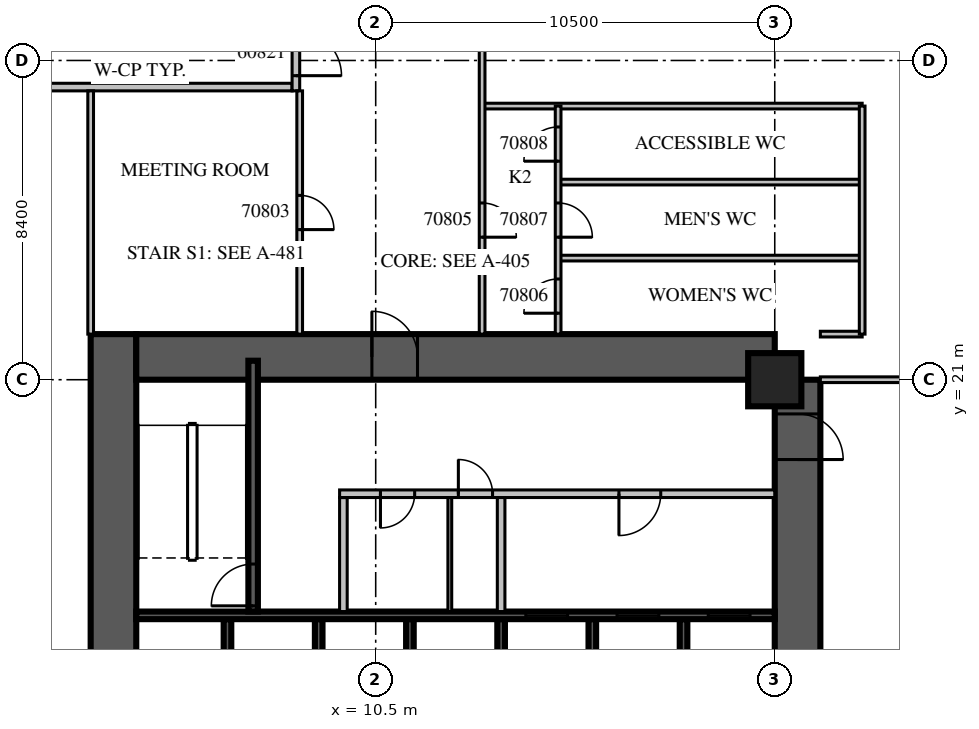
"""IFC4 building model, lengths in metres.
Left out: names, types, materials, properties, quantities, classifications, styles, units other than length and angle.
Written with IfcOpenShell. Run it as: python <this file> out.ifc"""

import sys

from ifc_helpers import new_model, si_unit, direction, frame, frame_2d, origin, origin_2d, place, context, subcontext, project, spatial, rectangle, extrude, source, transform, mapped, element, fill, save


model = new_model("IFC4")
c1 = context("Model", 3, precision=1e-05, world=origin(), true_north=direction((0.0, 1.0)))
c2 = subcontext(c1, "Body", "Model", "MODEL_VIEW")
j1 = project(units=[si_unit("LENGTHUNIT", "METRE"), si_unit("PLANEANGLEUNIT", "RADIAN")], contexts=[c1])
p1 = place(None, origin())
s1 = spatial("IfcSite", under=j1, at=p1, CompositionType="ELEMENT")
p2 = place(p1, origin())
s2 = spatial("IfcBuilding", under=s1, at=p2, CompositionType="ELEMENT")
p3 = place(p2, frame((0.0, 0.0, 29.1)))
s3 = spatial("IfcBuildingStorey", under=s2, at=p3, CompositionType="ELEMENT", Elevation=29.1)
m1 = source(origin(), c2, "Body", "SweptSolid", [
    extrude(rectangle(XDim=1.4, YDim=1.4, at=origin_2d()), origin(), (0.0, 0.0, 1.0), 5.4),
])
p4 = place(p3, frame((21.0, 21.0, 0.0), z_axis=(0.0, 0.0, 1.0), x_axis=(1.0, 0.0, 0.0)))
e1 = element("IfcColumn", 1, at=p4, inside=s3, PredefinedType="COLUMN", context=c2, shape_type="MappedRepresentation", body=[
    mapped(m1, transform((0.0, 0.0, 0.0), scale=1.0)),
])
m2 = source(origin(), c2, "Body", "SweptSolid", [
    extrude(rectangle(XDim=18.0, YDim=1.2, at=frame_2d((9.0, 0.0))), origin(), (0.0, 0.0, 1.0), 5.4),
])
p5 = place(p3, frame((3.6, 4.2, 0.0), z_axis=(0.0, 0.0, 1.0), x_axis=(0.0, 1.0, 0.0)))
e2 = element("IfcWall", 2, at=p5, inside=s3, PredefinedType="SHEAR", context=c2, shape_type="MappedRepresentation", body=[
    mapped(m2, transform((0.0, 0.0, 0.0), scale=1.0)),
])
m3 = source(origin(), c2, "Body", "SweptSolid", [
    extrude(rectangle(XDim=2.2, YDim=2.1, at=frame_2d((1.1, 1.05))), frame((0.0, 0.61, 0.0), z_axis=(0.0, -1.0, 0.0), x_axis=(1.0, 0.0, 0.0)), (0.0, 0.0, 1.0), 1.22),
])
p6 = place(p5, frame((4.6, 0.0, 0.0)))
e3 = element("IfcOpeningElement", 3, at=p6, cuts=e2, PredefinedType="OPENING", context=c2, shape_type="MappedRepresentation", body=[
    mapped(m3, transform((0.0, 0.0, 0.0), scale=1.0)),
])
m4 = source(origin(), c2, "Body", "SweptSolid", [
    extrude(rectangle(XDim=16.8, YDim=1.2, at=frame_2d((8.4, 0.0))), origin(), (0.0, 0.0, 1.0), 5.4),
])
p7 = place(p3, frame((21.6, 4.2, 0.0), z_axis=(0.0, 0.0, 1.0), x_axis=(0.0, 1.0, 0.0)))
e4 = element("IfcWall", 4, at=p7, inside=s3, PredefinedType="SHEAR", context=c2, shape_type="MappedRepresentation", body=[
    mapped(m4, transform((0.0, 0.0, 0.0), scale=1.0)),
])
p8 = place(p7, frame((4.2, 0.0, 0.0)))
e5 = element("IfcOpeningElement", 5, at=p8, cuts=e4, PredefinedType="OPENING", context=c2, shape_type="MappedRepresentation", body=[
    mapped(m3, transform((0.0, 0.0, 0.0), scale=1.0)),
])
m5 = source(origin(), c2, "Body", "SweptSolid", [
    extrude(rectangle(XDim=1.2, YDim=2.1, at=frame_2d((0.6, 1.05))), frame((0.0, 0.61, 0.0), z_axis=(0.0, -1.0, 0.0), x_axis=(1.0, 0.0, 0.0)), (0.0, 0.0, 1.0), 1.22),
])
p9 = place(p7, frame((14.7, 0.0, 0.0)))
e6 = element("IfcOpeningElement", 6, at=p9, cuts=e4, PredefinedType="OPENING", context=c2, shape_type="MappedRepresentation", body=[
    mapped(m5, transform((0.0, 0.0, 0.0), scale=1.0)),
])
p10 = place(p3, frame((4.2, 21.6, 0.0), z_axis=(0.0, 0.0, 1.0), x_axis=(1.0, 0.0, 0.0)))
e7 = element("IfcWall", 7, at=p10, inside=s3, PredefinedType="SHEAR", context=c2, shape_type="MappedRepresentation", body=[
    mapped(m4, transform((0.0, 0.0, 0.0), scale=1.0)),
])
p11 = place(p10, frame((6.2, 0.0, 0.0)))
e8 = element("IfcOpeningElement", 8, at=p11, cuts=e7, PredefinedType="OPENING", context=c2, shape_type="MappedRepresentation", body=[
    mapped(m5, transform((0.0, 0.0, 0.0), scale=1.0)),
])
m6 = source(origin(), c2, "Body", "SweptSolid", [
    extrude(rectangle(XDim=3.0, YDim=0.2, at=frame_2d((1.5, 0.0))), origin(), (0.0, 0.0, 1.0), 5.4),
])
for number, where, z_axis, x_axis in (
    (9, (6.6, 11.7, 0.0), (0.0, 0.0, 1.0), (0.0, 1.0, 0.0)),
    (10, (9.0, 11.7, 0.0), (0.0, 0.0, 1.0), (0.0, 1.0, 0.0)),
    (11, (11.4, 11.7, 0.0), (0.0, 0.0, 1.0), (0.0, 1.0, 0.0)),
    (12, (13.8, 11.7, 0.0), (0.0, 0.0, 1.0), (0.0, 1.0, 0.0)),
    (13, (16.2, 11.7, 0.0), (0.0, 0.0, 1.0), (0.0, 1.0, 0.0)),
    (14, (18.6, 11.7, 0.0), (0.0, 0.0, 1.0), (0.0, 1.0, 0.0)),
):
    element("IfcWall", number, at=place(p3, frame(where, z_axis=z_axis, x_axis=x_axis)), inside=s3, PredefinedType="SOLIDWALL", context=c2, shape_type="MappedRepresentation", body=[
        mapped(m6, transform((0.0, 0.0, 0.0), scale=1.0)),
    ])
m7 = source(origin(), c2, "Body", "SweptSolid", [
    extrude(rectangle(XDim=16.8, YDim=0.2, at=frame_2d((8.4, 0.0))), origin(), (0.0, 0.0, 1.0), 5.4),
])
p12 = place(p3, frame((4.2, 14.8, 0.0), z_axis=(0.0, 0.0, 1.0), x_axis=(1.0, 0.0, 0.0)))
e15 = element("IfcWall", 15, at=p12, inside=s3, PredefinedType="SOLIDWALL", context=c2, shape_type="MappedRepresentation", body=[
    mapped(m7, transform((0.0, 0.0, 0.0), scale=1.0)),
])
m8 = source(origin(), c2, "Body", "SweptSolid", [
    extrude(rectangle(XDim=1.1, YDim=2.1, at=frame_2d((0.55, 1.05))), frame((0.0, 0.11, 0.0), z_axis=(0.0, -1.0, 0.0), x_axis=(1.0, 0.0, 0.0)), (0.0, 0.0, 1.0), 0.22),
])
p13 = place(p12, frame((10.25, 0.0, 0.0)))
e16 = element("IfcOpeningElement", 16, at=p13, cuts=e15, PredefinedType="OPENING", context=c2, shape_type="MappedRepresentation", body=[
    mapped(m8, transform((0.0, 0.0, 0.0), scale=1.0)),
])
p14 = place(p12, frame((12.65, 0.0, 0.0)))
e17 = element("IfcOpeningElement", 17, at=p14, cuts=e15, PredefinedType="OPENING", context=c2, shape_type="MappedRepresentation", body=[
    mapped(m8, transform((0.0, 0.0, 0.0), scale=1.0)),
])
p15 = place(p12, frame((15.05, 0.0, 0.0)))
e18 = element("IfcOpeningElement", 18, at=p15, cuts=e15, PredefinedType="OPENING", context=c2, shape_type="MappedRepresentation", body=[
    mapped(m8, transform((0.0, 0.0, 0.0), scale=1.0)),
])
m9 = source(origin(), c2, "Body", "SweptSolid", [
    extrude(rectangle(XDim=6.6, YDim=0.25, at=frame_2d((3.3, 0.0))), origin(), (0.0, 0.0, 1.0), 4.8),
])
p16 = place(p3, frame((7.275, 14.9, 0.0), z_axis=(0.0, 0.0, 1.0), x_axis=(0.0, 1.0, 0.0)))
e19 = element("IfcWall", 19, at=p16, inside=s3, PredefinedType="SOLIDWALL", context=c2, shape_type="MappedRepresentation", body=[
    mapped(m9, transform((0.0, 0.0, 0.0), scale=1.0)),
])
m10 = source(origin(), c2, "Body", "SweptSolid", [
    extrude(rectangle(XDim=1.1, YDim=2.1, at=frame_2d((0.55, 1.05))), frame((0.0, 0.135, 0.0), z_axis=(0.0, -1.0, 0.0), x_axis=(1.0, 0.0, 0.0)), (0.0, 0.0, 1.0), 0.27),
])
p17 = place(p16, frame((0.15, 0.0, 0.0)))
e20 = element("IfcOpeningElement", 20, at=p17, cuts=e19, PredefinedType="OPENING", context=c2, shape_type="MappedRepresentation", body=[
    mapped(m10, transform((0.0, 0.0, 0.0), scale=1.0)),
])
m11 = source(origin(), c2, "Body", "SweptSolid", [
    extrude(rectangle(XDim=3.0, YDim=0.2, at=frame_2d((1.5, 0.0))), origin(), (0.0, 0.0, 1.0), 4.8),
])
p18 = place(p3, frame((9.65, 14.9, 0.0), z_axis=(0.0, 0.0, 1.0), x_axis=(0.0, 1.0, 0.0)))
e21 = element("IfcWall", 21, at=p18, inside=s3, PredefinedType="PARTITIONING", context=c2, shape_type="MappedRepresentation", body=[
    mapped(m11, transform((0.0, 0.0, 0.0), scale=1.0)),
])
m12 = source(origin(), c2, "Body", "SweptSolid", [
    extrude(rectangle(XDim=11.45, YDim=0.2, at=frame_2d((5.725, 0.0))), origin(), (0.0, 0.0, 1.0), 4.8),
])
p19 = place(p3, frame((9.55, 18.0, 0.0), z_axis=(0.0, 0.0, 1.0), x_axis=(1.0, 0.0, 0.0)))
e22 = element("IfcWall", 22, at=p19, inside=s3, PredefinedType="PARTITIONING", context=c2, shape_type="MappedRepresentation", body=[
    mapped(m12, transform((0.0, 0.0, 0.0), scale=1.0)),
])
m13 = source(origin(), c2, "Body", "SweptSolid", [
    extrude(rectangle(XDim=0.9, YDim=2.1, at=frame_2d((0.45, 1.05))), frame((0.0, 0.11, 0.0), z_axis=(0.0, -1.0, 0.0), x_axis=(1.0, 0.0, 0.0)), (0.0, 0.0, 1.0), 0.22),
])
p20 = place(p19, frame((1.075, 0.0, 0.0)))
e23 = element("IfcOpeningElement", 23, at=p20, cuts=e22, PredefinedType="OPENING", context=c2, shape_type="MappedRepresentation", body=[
    mapped(m13, transform((0.0, 0.0, 0.0), scale=1.0)),
])
p21 = place(p19, frame((3.125, 0.0, 0.0)))
e24 = element("IfcOpeningElement", 24, at=p21, cuts=e22, PredefinedType="OPENING", context=c2, shape_type="MappedRepresentation", body=[
    mapped(m13, transform((0.0, 0.0, 0.0), scale=1.0)),
])
p22 = place(p19, frame((7.35, 0.0, 0.0)))
e25 = element("IfcOpeningElement", 25, at=p22, cuts=e22, PredefinedType="OPENING", context=c2, shape_type="MappedRepresentation", body=[
    mapped(m8, transform((0.0, 0.0, 0.0), scale=1.0)),
])
p23 = place(p3, frame((13.8, 14.9, 0.0), z_axis=(0.0, 0.0, 1.0), x_axis=(0.0, 1.0, 0.0)))
e26 = element("IfcWall", 26, at=p23, inside=s3, PredefinedType="PARTITIONING", context=c2, shape_type="MappedRepresentation", body=[
    mapped(m11, transform((0.0, 0.0, 0.0), scale=1.0)),
])
m14 = source(origin(), c2, "Body", "SweptSolid", [
    extrude(rectangle(XDim=3.0, YDim=0.1, at=frame_2d((1.5, 0.0))), origin(), (0.0, 0.0, 1.0), 4.8),
])
p24 = place(p3, frame((12.45, 14.9, 0.0), z_axis=(0.0, 0.0, 1.0), x_axis=(0.0, 1.0, 0.0)))
e27 = element("IfcWall", 27, at=p24, inside=s3, PredefinedType="PARTITIONING", context=c2, shape_type="MappedRepresentation", body=[
    mapped(m14, transform((0.0, 0.0, 0.0), scale=1.0)),
])
m15 = source(origin(), c2, "Body", "SweptSolid", [
    extrude(rectangle(XDim=8.0, YDim=0.2, at=frame_2d((4.0, 0.0))), origin(), (0.0, 0.0, 1.0), 4.8),
])
p25 = place(p3, frame((0.3, 28.7, 0.0), z_axis=(0.0, 0.0, 1.0), x_axis=(1.0, 0.0, 0.0)))
e28 = element("IfcWall", 28, at=p25, inside=s3, PredefinedType="PARTITIONING", context=c2, shape_type="MappedRepresentation", body=[
    mapped(m15, transform((0.0, 0.0, 0.0), scale=1.0)),
])
m16 = source(origin(), c2, "Body", "SweptSolid", [
    extrude(rectangle(XDim=5.45, YDim=0.2, at=frame_2d((2.725, 0.0))), origin(), (0.0, 0.0, 1.0), 4.8),
])
p26 = place(p3, frame((8.4, 28.6, 0.0), z_axis=(0.0, 0.0, 1.0), x_axis=(0.0, 1.0, 0.0)))
e29 = element("IfcWall", 29, at=p26, inside=s3, PredefinedType="PARTITIONING", context=c2, shape_type="MappedRepresentation", body=[
    mapped(m16, transform((0.0, 0.0, 0.0), scale=1.0)),
])
m17 = source(origin(), c2, "Body", "SweptSolid", [
    extrude(rectangle(XDim=1.2, YDim=2.1, at=frame_2d((0.6, 1.05))), frame((0.0, 0.11, 0.0), z_axis=(0.0, -1.0, 0.0), x_axis=(1.0, 0.0, 0.0)), (0.0, 0.0, 1.0), 0.22),
])
p27 = place(p26, frame((0.4, 0.0, 0.0)))
e30 = element("IfcOpeningElement", 30, at=p27, cuts=e29, PredefinedType="OPENING", context=c2, shape_type="MappedRepresentation", body=[
    mapped(m17, transform((0.0, 0.0, 0.0), scale=1.0)),
])
p28 = place(p26, frame((3.25, 0.0, 0.0)))
e31 = element("IfcOpeningElement", 31, at=p28, cuts=e29, PredefinedType="OPENING", context=c2, shape_type="MappedRepresentation", body=[
    mapped(m13, transform((0.0, 0.0, 0.0), scale=1.0)),
])
m18 = source(origin(), c2, "Body", "SweptSolid", [
    extrude(rectangle(XDim=16.2, YDim=0.15, at=frame_2d((8.1, 0.0))), origin(), (0.0, 0.0, 1.0), 4.8),
])
p29 = place(p3, frame((22.2, 21.0, 0.0), z_axis=(0.0, 0.0, 1.0), x_axis=(1.0, 0.0, 0.0)))
e32 = element("IfcWall", 32, at=p29, inside=s3, PredefinedType="PARTITIONING", context=c2, shape_type="MappedRepresentation", body=[
    mapped(m18, transform((0.0, 0.0, 0.0), scale=1.0)),
])
m19 = source(origin(), c2, "Body", "SweptSolid", [
    extrude(rectangle(XDim=1.1, YDim=0.15, at=frame_2d((0.55, 0.0))), origin(), (0.0, 0.0, 1.0), 4.8),
])
p30 = place(p3, frame((22.2, 22.2, 0.0), z_axis=(0.0, 0.0, 1.0), x_axis=(1.0, 0.0, 0.0)))
e33 = element("IfcWall", 33, at=p30, inside=s3, PredefinedType="PARTITIONING", context=c2, shape_type="MappedRepresentation", body=[
    mapped(m19, transform((0.0, 0.0, 0.0), scale=1.0)),
])
m20 = source(origin(), c2, "Body", "SweptSolid", [
    extrude(rectangle(XDim=8.0, YDim=0.15, at=frame_2d((4.0, 0.0))), origin(), (0.0, 0.0, 1.0), 4.8),
])
for number, where, z_axis, x_axis in (
    (34, (15.3, 24.2, 0.0), (0.0, 0.0, 1.0), (1.0, 0.0, 0.0)),
    (35, (15.3, 26.2, 0.0), (0.0, 0.0, 1.0), (1.0, 0.0, 0.0)),
):
    element("IfcWall", number, at=place(p3, frame(where, z_axis=z_axis, x_axis=x_axis)), inside=s3, PredefinedType="PARTITIONING", context=c2, shape_type="MappedRepresentation", body=[
        mapped(m20, transform((0.0, 0.0, 0.0), scale=1.0)),
    ])
m21 = source(origin(), c2, "Body", "SweptSolid", [
    extrude(rectangle(XDim=10.0, YDim=0.15, at=frame_2d((5.0, 0.0))), origin(), (0.0, 0.0, 1.0), 4.8),
])
p31 = place(p3, frame((13.3, 28.2, 0.0), z_axis=(0.0, 0.0, 1.0), x_axis=(1.0, 0.0, 0.0)))
e36 = element("IfcWall", 36, at=p31, inside=s3, PredefinedType="PARTITIONING", context=c2, shape_type="MappedRepresentation", body=[
    mapped(m21, transform((0.0, 0.0, 0.0), scale=1.0)),
])
m22 = source(origin(), c2, "Body", "SweptSolid", [
    extrude(rectangle(XDim=6.4, YDim=0.15, at=frame_2d((3.2, 0.0))), origin(), (0.0, 0.0, 1.0), 4.8),
])
p32 = place(p3, frame((3.0, 22.2, 0.0), z_axis=(0.0, 0.0, 1.0), x_axis=(0.0, 1.0, 0.0)))
e37 = element("IfcWall", 37, at=p32, inside=s3, PredefinedType="PARTITIONING", context=c2, shape_type="MappedRepresentation", body=[
    mapped(m22, transform((0.0, 0.0, 0.0), scale=1.0)),
])
p33 = place(p3, frame((8.5, 22.2, 0.0), z_axis=(0.0, 0.0, 1.0), x_axis=(0.0, 1.0, 0.0)))
e38 = element("IfcWall", 38, at=p33, inside=s3, PredefinedType="PARTITIONING", context=c2, shape_type="MappedRepresentation", body=[
    mapped(m22, transform((0.0, 0.0, 0.0), scale=1.0)),
])
m23 = source(origin(), c2, "Body", "SweptSolid", [
    extrude(rectangle(XDim=0.9, YDim=2.1, at=frame_2d((0.45, 1.05))), frame((0.0, 0.085, 0.0), z_axis=(0.0, -1.0, 0.0), x_axis=(1.0, 0.0, 0.0)), (0.0, 0.0, 1.0), 0.17),
])
p34 = place(p33, frame((2.75, 0.0, 0.0)))
e39 = element("IfcOpeningElement", 39, at=p34, cuts=e38, PredefinedType="OPENING", context=c2, shape_type="MappedRepresentation", body=[
    mapped(m23, transform((0.0, 0.0, 0.0), scale=1.0)),
])
m24 = source(origin(), c2, "Body", "SweptSolid", [
    extrude(rectangle(XDim=20.3, YDim=0.15, at=frame_2d((10.15, 0.0))), origin(), (0.0, 0.0, 1.0), 4.8),
])
p35 = place(p3, frame((13.3, 22.2, 0.0), z_axis=(0.0, 0.0, 1.0), x_axis=(0.0, 1.0, 0.0)))
e40 = element("IfcWall", 40, at=p35, inside=s3, PredefinedType="PARTITIONING", context=c2, shape_type="MappedRepresentation", body=[
    mapped(m24, transform((0.0, 0.0, 0.0), scale=1.0)),
])
p36 = place(p35, frame((2.55, 0.0, 0.0)))
e41 = element("IfcOpeningElement", 41, at=p36, cuts=e40, PredefinedType="OPENING", context=c2, shape_type="MappedRepresentation", body=[
    mapped(m23, transform((0.0, 0.0, 0.0), scale=1.0)),
])
m25 = source(origin(), c2, "Body", "SweptSolid", [
    extrude(rectangle(XDim=6.0, YDim=0.15, at=frame_2d((3.0, 0.0))), origin(), (0.0, 0.0, 1.0), 4.8),
])
p37 = place(p3, frame((15.3, 22.2, 0.0), z_axis=(0.0, 0.0, 1.0), x_axis=(0.0, 1.0, 0.0)))
e42 = element("IfcWall", 42, at=p37, inside=s3, PredefinedType="PARTITIONING", context=c2, shape_type="MappedRepresentation", body=[
    mapped(m25, transform((0.0, 0.0, 0.0), scale=1.0)),
])
p38 = place(p37, frame((0.55, 0.0, 0.0)))
e43 = element("IfcOpeningElement", 43, at=p38, cuts=e42, PredefinedType="OPENING", context=c2, shape_type="MappedRepresentation", body=[
    mapped(m23, transform((0.0, 0.0, 0.0), scale=1.0)),
])
p39 = place(p37, frame((2.55, 0.0, 0.0)))
e44 = element("IfcOpeningElement", 44, at=p39, cuts=e42, PredefinedType="OPENING", context=c2, shape_type="MappedRepresentation", body=[
    mapped(m23, transform((0.0, 0.0, 0.0), scale=1.0)),
])
p40 = place(p37, frame((4.55, 0.0, 0.0)))
e45 = element("IfcOpeningElement", 45, at=p40, cuts=e42, PredefinedType="OPENING", context=c2, shape_type="MappedRepresentation", body=[
    mapped(m23, transform((0.0, 0.0, 0.0), scale=1.0)),
])
p41 = place(p3, frame((23.3, 22.2, 0.0), z_axis=(0.0, 0.0, 1.0), x_axis=(0.0, 1.0, 0.0)))
e46 = element("IfcWall", 46, at=p41, inside=s3, PredefinedType="PARTITIONING", context=c2, shape_type="MappedRepresentation", body=[
    mapped(m25, transform((0.0, 0.0, 0.0), scale=1.0)),
])
m26 = source(origin(), c2, "Body", "SweptSolid", [
    extrude(rectangle(XDim=1.1, YDim=2.1, at=frame_2d((0.55, 1.05))), frame((0.0, 0.025, 0.0), z_axis=(0.0, -1.0, 0.0), x_axis=(1.0, 0.0, 0.0)), (0.0, 0.0, 1.0), 0.05),
])
p42 = place(p13, origin())
e47 = element("IfcDoor", 47, at=p42, inside=s3, OperationType="SLIDING_TO_LEFT", PredefinedType="DOOR", context=c2, shape_type="MappedRepresentation", body=[
    mapped(m26, transform((0.0, 0.0, 0.0), scale=1.0)),
])
fill(e16, e47)
p43 = place(p14, origin())
e48 = element("IfcDoor", 48, at=p43, inside=s3, OperationType="SLIDING_TO_LEFT", PredefinedType="DOOR", context=c2, shape_type="MappedRepresentation", body=[
    mapped(m26, transform((0.0, 0.0, 0.0), scale=1.0)),
])
fill(e17, e48)
p44 = place(p15, origin())
e49 = element("IfcDoor", 49, at=p44, inside=s3, OperationType="SLIDING_TO_LEFT", PredefinedType="DOOR", context=c2, shape_type="MappedRepresentation", body=[
    mapped(m26, transform((0.0, 0.0, 0.0), scale=1.0)),
])
fill(e18, e49)
p45 = place(p17, origin())
e50 = element("IfcDoor", 50, at=p45, inside=s3, OperationType="SINGLE_SWING_LEFT", PredefinedType="DOOR", context=c2, shape_type="MappedRepresentation", body=[
    mapped(m26, transform((0.0, 0.0, 0.0), scale=1.0)),
])
fill(e20, e50)
m27 = source(origin(), c2, "Body", "SweptSolid", [
    extrude(rectangle(XDim=0.9, YDim=2.1, at=frame_2d((0.45, 1.05))), frame((0.0, 0.025, 0.0), z_axis=(0.0, -1.0, 0.0), x_axis=(1.0, 0.0, 0.0)), (0.0, 0.0, 1.0), 0.05),
])
p46 = place(p20, origin())
e51 = element("IfcDoor", 51, at=p46, inside=s3, OperationType="SINGLE_SWING_RIGHT", PredefinedType="DOOR", context=c2, shape_type="MappedRepresentation", body=[
    mapped(m27, transform((0.0, 0.0, 0.0), scale=1.0)),
])
fill(e23, e51)
p47 = place(p21, origin())
e52 = element("IfcDoor", 52, at=p47, inside=s3, OperationType="SINGLE_SWING_LEFT", PredefinedType="DOOR", context=c2, shape_type="MappedRepresentation", body=[
    mapped(m27, transform((0.0, 0.0, 0.0), scale=1.0)),
])
fill(e24, e52)
p48 = place(p22, origin())
e53 = element("IfcDoor", 53, at=p48, inside=s3, OperationType="SINGLE_SWING_RIGHT", PredefinedType="DOOR", context=c2, shape_type="MappedRepresentation", body=[
    mapped(m26, transform((0.0, 0.0, 0.0), scale=1.0)),
])
fill(e25, e53)
m28 = source(origin(), c2, "Body", "SweptSolid", [
    extrude(rectangle(XDim=1.2, YDim=2.1, at=frame_2d((0.6, 1.05))), frame((0.0, 0.025, 0.0), z_axis=(0.0, -1.0, 0.0), x_axis=(1.0, 0.0, 0.0)), (0.0, 0.0, 1.0), 0.05),
])
p49 = place(p27, origin())
e54 = element("IfcDoor", 54, at=p49, inside=s3, OperationType="SINGLE_SWING_RIGHT", PredefinedType="DOOR", context=c2, shape_type="MappedRepresentation", body=[
    mapped(m28, transform((0.0, 0.0, 0.0), scale=1.0)),
])
fill(e30, e54)
p50 = place(p11, origin())
e55 = element("IfcDoor", 55, at=p50, inside=s3, OperationType="SINGLE_SWING_LEFT", PredefinedType="DOOR", context=c2, shape_type="MappedRepresentation", body=[
    mapped(m28, transform((0.0, 0.0, 0.0), scale=1.0)),
])
fill(e8, e55)
p51 = place(p9, origin())
e56 = element("IfcDoor", 56, at=p51, inside=s3, OperationType="SINGLE_SWING_RIGHT", PredefinedType="DOOR", context=c2, shape_type="MappedRepresentation", body=[
    mapped(m28, transform((0.0, 0.0, 0.0), scale=1.0)),
])
fill(e6, e56)
p52 = place(p34, origin())
e57 = element("IfcDoor", 57, at=p52, inside=s3, OperationType="SINGLE_SWING_RIGHT", PredefinedType="DOOR", context=c2, shape_type="MappedRepresentation", body=[
    mapped(m27, transform((0.0, 0.0, 0.0), scale=1.0)),
])
fill(e39, e57)
p53 = place(p36, origin())
e58 = element("IfcDoor", 58, at=p53, inside=s3, OperationType="SINGLE_SWING_RIGHT", PredefinedType="DOOR", context=c2, shape_type="MappedRepresentation", body=[
    mapped(m27, transform((0.0, 0.0, 0.0), scale=1.0)),
])
fill(e41, e58)
p54 = place(p38, origin())
e59 = element("IfcDoor", 59, at=p54, inside=s3, OperationType="SINGLE_SWING_LEFT", PredefinedType="DOOR", context=c2, shape_type="MappedRepresentation", body=[
    mapped(m27, transform((0.0, 0.0, 0.0), scale=1.0)),
])
fill(e43, e59)
p55 = place(p39, origin())
e60 = element("IfcDoor", 60, at=p55, inside=s3, OperationType="SINGLE_SWING_RIGHT", PredefinedType="DOOR", context=c2, shape_type="MappedRepresentation", body=[
    mapped(m27, transform((0.0, 0.0, 0.0), scale=1.0)),
])
fill(e44, e60)
p56 = place(p40, origin())
e61 = element("IfcDoor", 61, at=p56, inside=s3, OperationType="SINGLE_SWING_LEFT", PredefinedType="DOOR", context=c2, shape_type="MappedRepresentation", body=[
    mapped(m27, transform((0.0, 0.0, 0.0), scale=1.0)),
])
fill(e45, e61)
save(model, sys.argv[1])
